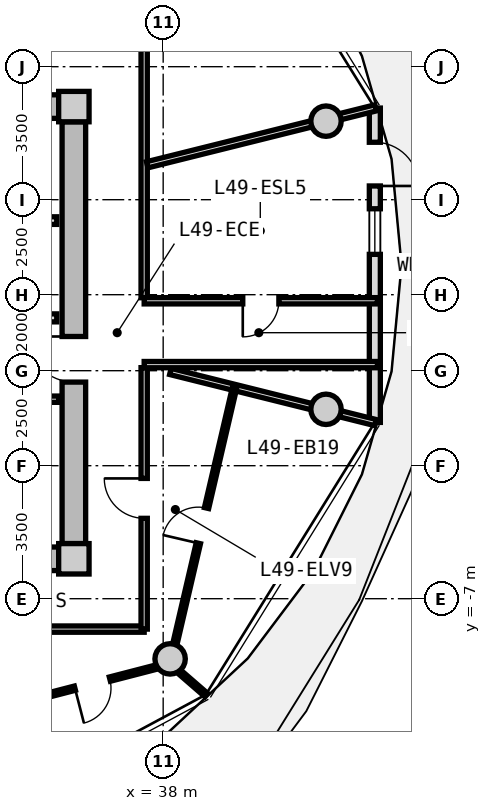
"""IFC4 building model, lengths in metres.
Left out: names, types, materials, properties, quantities, classifications, styles, units other than length and angle.
Written with IfcOpenShell. Run it as: python <this file> out.ifc"""

import sys

from ifc_helpers import new_model, si_unit, direction, frame, frame_2d, origin, origin_2d, place, context, subcontext, project, spatial, rectangle, circle, extrude, source, transform, mapped, element, fill, save


model = new_model("IFC4")
c1 = context("Model", 3, precision=1e-05, world=origin(), true_north=direction((0.0, 1.0)))
c2 = subcontext(c1, "Body", "Model", "MODEL_VIEW")
j1 = project(units=[si_unit("LENGTHUNIT", "METRE"), si_unit("PLANEANGLEUNIT", "RADIAN")], contexts=[c1])
p1 = place(None, origin())
s1 = spatial("IfcSite", under=j1, at=p1, CompositionType="ELEMENT")
p2 = place(p1, origin())
s2 = spatial("IfcBuilding", under=s1, at=p2, CompositionType="ELEMENT")
p3 = place(p2, frame((0.0, 0.0, 158.7)))
s3 = spatial("IfcBuildingStorey", under=s2, at=p3, CompositionType="ELEMENT", Elevation=158.7)
m1 = source(origin(), c2, "Body", "SweptSolid", [
    extrude(rectangle(XDim=0.8, YDim=0.8, at=origin_2d()), origin(), (0.0, 0.0, 1.0), 3.05),
])
for number, where, z_axis, x_axis in (
    (1, (35.65, -5.95, 0.0), (0.0, 0.0, 1.0), (1.0, 0.0, 0.0)),
    (2, (35.65, 5.95, 0.0), (0.0, 0.0, 1.0), (1.0, 0.0, 0.0)),
):
    element("IfcColumn", number, at=place(p3, frame(where, z_axis=z_axis, x_axis=x_axis)), inside=s3, PredefinedType="COLUMN", context=c2, shape_type="MappedRepresentation", body=[
        mapped(m1, transform((0.0, 0.0, 0.0), x_axis=(1.0, 0.0, 0.0), y_axis=(0.0, 1.0, 0.0), z_axis=(0.0, 0.0, 1.0), scale=1.0)),
    ])
m2 = source(origin(), c2, "Body", "SweptSolid", [
    extrude(rectangle(XDim=14.5, YDim=0.62, at=frame_2d((7.25, 0.0))), origin(), (0.0, 0.0, 1.0), 2.81),
])
for number, where, z_axis, x_axis in (
    (3, (20.75, 5.95, 0.0), (0.0, 0.0, 1.0), (1.0, 0.0, 0.0)),
    (4, (35.25, -5.95, 0.0), (0.0, 0.0, 1.0), (-1.0, 0.0, 0.0)),
):
    element("IfcWall", number, at=place(p3, frame(where, z_axis=z_axis, x_axis=x_axis)), inside=s3, PredefinedType="SHEAR", context=c2, shape_type="MappedRepresentation", body=[
        mapped(m2, transform((0.0, 0.0, 0.0), x_axis=(1.0, 0.0, 0.0), y_axis=(0.0, 1.0, 0.0), z_axis=(0.0, 0.0, 1.0), scale=1.0)),
    ])
m3 = source(origin(), c2, "Body", "SweptSolid", [
    extrude(rectangle(XDim=11.1, YDim=0.62, at=frame_2d((5.55, 0.0))), origin(), (0.0, 0.0, 1.0), 2.81),
])
p4 = place(p3, frame((35.65, 5.55, 0.0), z_axis=(0.0, 0.0, 1.0), x_axis=(0.0, -1.0, 0.0)))
e5 = element("IfcWall", 5, at=p4, inside=s3, PredefinedType="SHEAR", context=c2, shape_type="MappedRepresentation", body=[
    mapped(m3, transform((0.0, 0.0, 0.0), x_axis=(1.0, 0.0, 0.0), y_axis=(0.0, 1.0, 0.0), z_axis=(0.0, 0.0, 1.0), scale=1.0)),
])
p5 = place(p4, frame((5.65, 0.0, 0.0)))
e6 = element("IfcOpeningElement", 6, at=p5, cuts=e5, PredefinedType="OPENING", context=c2, shape_type="SweptSolid", body=[
    extrude(rectangle(XDim=1.2, YDim=2.15, at=frame_2d((0.6, 1.075))), frame((0.0, 0.32, 0.0), z_axis=(0.0, -1.0, 0.0), x_axis=(1.0, 0.0, 0.0)), (0.0, 0.0, 1.0), 0.64),
])
m4 = source(origin(), c2, "Body", "SweptSolid", [
    extrude(circle(Radius=0.4, at=origin_2d()), origin(), (0.0, 0.0, 1.0), 3.05),
])
for number, where, z_axis, x_axis in (
    (7, (42.285, 5.567, 0.0), (0.0, 0.0, 1.0), (1.0, 0.0, 0.0)),
    (8, (38.183, -8.584, 0.0), (0.0, 0.0, 1.0), (1.0, 0.0, 0.0)),
    (9, (42.285, -2.016, 0.0), (0.0, 0.0, 1.0), (1.0, 0.0, 0.0)),
):
    element("IfcColumn", number, at=place(p3, frame(where, z_axis=z_axis, x_axis=x_axis)), inside=s3, PredefinedType="COLUMN", context=c2, shape_type="MappedRepresentation", body=[
        mapped(m4, transform((0.0, 0.0, 0.0), x_axis=(1.0, 0.0, 0.0), y_axis=(0.0, 1.0, 0.0), z_axis=(0.0, 0.0, 1.0), scale=1.0)),
    ])
m5 = source(origin(), c2, "Body", "SweptSolid", [
    extrude(rectangle(XDim=8.272, YDim=0.29, at=frame_2d((4.136, 0.0))), origin(), (0.0, 0.0, 1.0), 2.81),
])
p6 = place(p3, frame((43.57, 5.911, 0.0), z_axis=(0.0, 0.0, 1.0), x_axis=(0.0, -1.0, 0.0)))
e10 = element("IfcWall", 10, at=p6, inside=s3, PredefinedType="SOLIDWALL", context=c2, shape_type="MappedRepresentation", body=[
    mapped(m5, transform((0.0, 0.0, 0.0), x_axis=(1.0, 0.0, 0.0), y_axis=(0.0, 1.0, 0.0), z_axis=(0.0, 0.0, 1.0), scale=1.0)),
])
p7 = place(p6, frame((0.9, 0.0, 0.0)))
e11 = element("IfcOpeningElement", 11, at=p7, cuts=e10, PredefinedType="OPENING", context=c2, shape_type="SweptSolid", body=[
    extrude(rectangle(XDim=1.15, YDim=2.25, at=frame_2d((0.575, 1.125))), frame((0.0, 0.155, 0.0), z_axis=(0.0, -1.0, 0.0), x_axis=(1.0, 0.0, 0.0)), (0.0, 0.0, 1.0), 0.31),
])
p8 = place(p6, frame((2.65, 0.0, 0.85)))
e12 = element("IfcOpeningElement", 12, at=p8, cuts=e10, PredefinedType="OPENING", context=c2, shape_type="SweptSolid", body=[
    extrude(rectangle(XDim=1.2, YDim=1.5, at=frame_2d((0.6, 0.75))), frame((0.0, 0.155, 0.0), z_axis=(0.0, -1.0, 0.0), x_axis=(1.0, 0.0, 0.0)), (0.0, 0.0, 1.0), 0.31),
])
m6 = source(origin(), c2, "Body", "SweptSolid", [
    extrude(rectangle(XDim=3.2, YDim=0.2, at=frame_2d((1.6, 0.0))), origin(), (0.0, 0.0, 1.0), 2.795),
])
p9 = place(p3, frame((32.0, 2.95, 0.0), z_axis=(0.0, 0.0, 1.0), x_axis=(1.0, 0.0, 0.0)))
e13 = element("IfcWall", 13, at=p9, inside=s3, PredefinedType="PARTITIONING", context=c2, shape_type="MappedRepresentation", body=[
    mapped(m6, transform((0.0, 0.0, 0.0), x_axis=(1.0, 0.0, 0.0), y_axis=(0.0, 1.0, 0.0), z_axis=(0.0, 0.0, 1.0), scale=1.0)),
])
m7 = source(origin(), c2, "Body", "SweptSolid", [
    extrude(rectangle(XDim=6.66, YDim=0.21, at=frame_2d((3.33, 0.0))), origin(), (0.0, 0.0, 1.0), 2.795),
])
p10 = place(p3, frame((28.54, 0.39, 0.0), z_axis=(0.0, 0.0, 1.0), x_axis=(1.0, 0.0, 0.0)))
e14 = element("IfcWall", 14, at=p10, inside=s3, PredefinedType="PARTITIONING", context=c2, shape_type="MappedRepresentation", body=[
    mapped(m7, transform((0.0, 0.0, 0.0), x_axis=(1.0, 0.0, 0.0), y_axis=(0.0, 1.0, 0.0), z_axis=(0.0, 0.0, 1.0), scale=1.0)),
])
p11 = place(p10, frame((1.0, 0.0, 0.0)))
e15 = element("IfcOpeningElement", 15, at=p11, cuts=e14, PredefinedType="OPENING", context=c2, shape_type="SweptSolid", body=[
    extrude(rectangle(XDim=1.2, YDim=2.15, at=frame_2d((0.6, 1.075))), frame((0.0, 0.115, 0.0), z_axis=(0.0, -1.0, 0.0), x_axis=(1.0, 0.0, 0.0)), (0.0, 0.0, 1.0), 0.23),
])
m8 = source(origin(), c2, "Body", "SweptSolid", [
    extrude(rectangle(XDim=2.7, YDim=0.165, at=frame_2d((1.35, 0.0))), origin(), (0.0, 0.0, 1.0), 2.795),
])
p12 = place(p3, frame((32.55, -1.75, 0.0), z_axis=(0.0, 0.0, 1.0), x_axis=(1.0, 0.0, 0.0)))
e16 = element("IfcWall", 16, at=p12, inside=s3, PredefinedType="PARTITIONING", context=c2, shape_type="MappedRepresentation", body=[
    mapped(m8, transform((0.0, 0.0, 0.0), x_axis=(1.0, 0.0, 0.0), y_axis=(0.0, 1.0, 0.0), z_axis=(0.0, 0.0, 1.0), scale=1.0)),
])
p13 = place(p12, frame((0.85, 0.0, 0.0)))
e17 = element("IfcOpeningElement", 17, at=p13, cuts=e16, PredefinedType="OPENING", context=c2, shape_type="SweptSolid", body=[
    extrude(rectangle(XDim=0.925, YDim=2.1, at=frame_2d((0.462, 1.05))), frame((0.0, 0.093, 0.0), z_axis=(0.0, -1.0, 0.0), x_axis=(1.0, 0.0, 0.0)), (0.0, 0.0, 1.0), 0.185),
])
m9 = source(origin(), c2, "Body", "SweptSolid", [
    extrude(rectangle(XDim=19.0, YDim=0.165, at=frame_2d((9.5, 0.0))), origin(), (0.0, 0.0, 1.0), 2.795),
])
p14 = place(p3, frame((37.5, -7.8, 0.0), z_axis=(0.0, 0.0, 1.0), x_axis=(-1.0, 0.0, 0.0)))
e18 = element("IfcWall", 18, at=p14, inside=s3, PredefinedType="PARTITIONING", context=c2, shape_type="MappedRepresentation", body=[
    mapped(m9, transform((0.0, 0.0, 0.0), x_axis=(1.0, 0.0, 0.0), y_axis=(0.0, 1.0, 0.0), z_axis=(0.0, 0.0, 1.0), scale=1.0)),
])
p15 = place(p14, frame((12.623, 0.0, 0.0)))
e19 = element("IfcOpeningElement", 19, at=p15, cuts=e18, PredefinedType="OPENING", context=c2, shape_type="SweptSolid", body=[
    extrude(rectangle(XDim=1.25, YDim=2.2, at=frame_2d((0.625, 1.1))), frame((0.0, 0.093, 0.0), z_axis=(0.0, -1.0, 0.0), x_axis=(1.0, 0.0, 0.0)), (0.0, 0.0, 1.0), 0.185),
])
m10 = source(origin(), c2, "Body", "SweptSolid", [
    extrude(rectangle(XDim=6.88, YDim=0.165, at=frame_2d((3.44, 0.0))), origin(), (0.0, 0.0, 1.0), 2.795),
])
p16 = place(p3, frame((37.5, 7.8, 0.0), z_axis=(0.0, 0.0, 1.0), x_axis=(0.0, -1.0, 0.0)))
e20 = element("IfcWall", 20, at=p16, inside=s3, PredefinedType="PARTITIONING", context=c2, shape_type="MappedRepresentation", body=[
    mapped(m10, transform((0.0, 0.0, 0.0), x_axis=(1.0, 0.0, 0.0), y_axis=(0.0, 1.0, 0.0), z_axis=(0.0, 0.0, 1.0), scale=1.0)),
])
p17 = place(p3, frame((37.5, -0.92, 0.0), z_axis=(0.0, 0.0, 1.0), x_axis=(0.0, -1.0, 0.0)))
e21 = element("IfcWall", 21, at=p17, inside=s3, PredefinedType="PARTITIONING", context=c2, shape_type="MappedRepresentation", body=[
    mapped(m10, transform((0.0, 0.0, 0.0), x_axis=(1.0, 0.0, 0.0), y_axis=(0.0, 1.0, 0.0), z_axis=(0.0, 0.0, 1.0), scale=1.0)),
])
p18 = place(p17, frame((2.915, 0.0, 0.0)))
e22 = element("IfcOpeningElement", 22, at=p18, cuts=e21, PredefinedType="OPENING", context=c2, shape_type="SweptSolid", body=[
    extrude(rectangle(XDim=1.05, YDim=2.15, at=frame_2d((0.525, 1.075))), frame((0.0, 0.093, 0.0), z_axis=(0.0, -1.0, 0.0), x_axis=(1.0, 0.0, 0.0)), (0.0, 0.0, 1.0), 0.185),
])
m11 = source(origin(), c2, "Body", "SweptSolid", [
    extrude(rectangle(XDim=5.564, YDim=0.165, at=frame_2d((2.782, 0.0))), origin(), (0.0, 0.0, 1.0), 2.345),
])
p19 = place(p3, frame((38.19, -1.02, 0.0), z_axis=(0.0, 0.0, 1.0), x_axis=(0.97031260977, -0.241854169533, 0.0)))
e23 = element("IfcWall", 23, at=p19, inside=s3, PredefinedType="PARTITIONING", context=c2, shape_type="MappedRepresentation", body=[
    mapped(m11, transform((0.0, 0.0, 0.0), x_axis=(1.0, 0.0, 0.0), y_axis=(0.0, 1.0, 0.0), z_axis=(0.0, 0.0, 1.0), scale=1.0)),
])
m12 = source(origin(), c2, "Body", "SweptSolid", [
    extrude(rectangle(XDim=6.193, YDim=0.165, at=frame_2d((3.096, 0.0))), origin(), (0.0, 0.0, 1.0), 2.345),
])
p20 = place(p3, frame((37.58, 4.419, 0.0), z_axis=(0.0, 0.0, 1.0), x_axis=(0.970309243466, 0.241867674657, 0.0)))
e24 = element("IfcWall", 24, at=p20, inside=s3, PredefinedType="PARTITIONING", context=c2, shape_type="MappedRepresentation", body=[
    mapped(m12, transform((0.0, 0.0, 0.0), x_axis=(1.0, 0.0, 0.0), y_axis=(0.0, 1.0, 0.0), z_axis=(0.0, 0.0, 1.0), scale=1.0)),
])
m13 = source(origin(), c2, "Body", "SweptSolid", [
    extrude(rectangle(XDim=6.139, YDim=0.165, at=frame_2d((3.069, 0.0))), origin(), (0.0, 0.0, 1.0), 2.795),
])
p21 = place(p3, frame((37.5, 0.84, 0.0), z_axis=(0.0, 0.0, 1.0), x_axis=(1.0, 0.0, 0.0)))
e25 = element("IfcWall", 25, at=p21, inside=s3, PredefinedType="PARTITIONING", context=c2, shape_type="MappedRepresentation", body=[
    mapped(m13, transform((0.0, 0.0, 0.0), x_axis=(1.0, 0.0, 0.0), y_axis=(0.0, 1.0, 0.0), z_axis=(0.0, 0.0, 1.0), scale=1.0)),
])
p22 = place(p21, frame((2.594, 0.0, 0.0)))
e26 = element("IfcOpeningElement", 26, at=p22, cuts=e25, PredefinedType="OPENING", context=c2, shape_type="SweptSolid", body=[
    extrude(rectangle(XDim=0.95, YDim=2.1, at=frame_2d((0.475, 1.05))), frame((0.0, 0.093, 0.0), z_axis=(0.0, -1.0, 0.0), x_axis=(1.0, 0.0, 0.0)), (0.0, 0.0, 1.0), 0.185),
])
p23 = place(p3, frame((43.639, -0.84, 0.0), z_axis=(0.0, 0.0, 1.0), x_axis=(-1.0, 0.0, 0.0)))
e27 = element("IfcWall", 27, at=p23, inside=s3, PredefinedType="PARTITIONING", context=c2, shape_type="MappedRepresentation", body=[
    mapped(m13, transform((0.0, 0.0, 0.0), x_axis=(1.0, 0.0, 0.0), y_axis=(0.0, 1.0, 0.0), z_axis=(0.0, 0.0, 1.0), scale=1.0)),
])
m14 = source(origin(), c2, "Body", "SweptSolid", [
    extrude(rectangle(XDim=7.469, YDim=0.115, at=frame_2d((3.734, 0.0))), origin(), (0.0, 0.0, 1.0), 2.795),
])
p24 = place(p3, frame((38.187, -8.715, 0.0), z_axis=(0.0, 0.0, 1.0), x_axis=(0.226790420763, 0.973943584121, 0.0)))
e28 = element("IfcWall", 28, at=p24, inside=s3, PredefinedType="PARTITIONING", context=c2, shape_type="MappedRepresentation", body=[
    mapped(m14, transform((0.0, 0.0, 0.0), x_axis=(1.0, 0.0, 0.0), y_axis=(0.0, 1.0, 0.0), z_axis=(0.0, 0.0, 1.0), scale=1.0)),
])
p25 = place(p24, frame((3.259, 0.0, 0.0)))
e29 = element("IfcOpeningElement", 29, at=p25, cuts=e28, PredefinedType="OPENING", context=c2, shape_type="SweptSolid", body=[
    extrude(rectangle(XDim=0.95, YDim=2.1, at=frame_2d((0.475, 1.05))), frame((0.0, 0.067, 0.0), z_axis=(0.0, -1.0, 0.0), x_axis=(1.0, 0.0, 0.0)), (0.0, 0.0, 1.0), 0.135),
])
m15 = source(origin(), c2, "Body", "SweptSolid", [
    extrude(rectangle(XDim=1.258, YDim=0.115, at=frame_2d((0.629, 0.0))), origin(), (0.0, 0.0, 1.0), 2.795),
])
p26 = place(p3, frame((38.187, -8.715, 0.0), z_axis=(0.0, 0.0, 1.0), x_axis=(0.755765923317, -0.654841865761, 0.0)))
e30 = element("IfcWall", 30, at=p26, inside=s3, PredefinedType="PARTITIONING", context=c2, shape_type="MappedRepresentation", body=[
    mapped(m15, transform((0.0, 0.0, 0.0), x_axis=(1.0, 0.0, 0.0), y_axis=(0.0, 1.0, 0.0), z_axis=(0.0, 0.0, 1.0), scale=1.0)),
])
m16 = source(origin(), c2, "Body", "SweptSolid", [
    extrude(rectangle(XDim=2.194, YDim=0.115, at=frame_2d((1.097, 0.0))), origin(), (0.0, 0.0, 1.0), 2.795),
])
p27 = place(p3, frame((34.095, -9.764, 0.0), z_axis=(0.0, 0.0, 1.0), x_axis=(0.540858831194, -0.841113383985, 0.0)))
e31 = element("IfcWall", 31, at=p27, inside=s3, PredefinedType="PARTITIONING", context=c2, shape_type="MappedRepresentation", body=[
    mapped(m16, transform((0.0, 0.0, 0.0), x_axis=(1.0, 0.0, 0.0), y_axis=(0.0, 1.0, 0.0), z_axis=(0.0, 0.0, 1.0), scale=1.0)),
])
m17 = source(origin(), c2, "Body", "SweptSolid", [
    extrude(rectangle(XDim=4.218, YDim=0.115, at=frame_2d((2.109, 0.0))), origin(), (0.0, 0.0, 1.0), 2.345),
])
p28 = place(p3, frame((34.095, -9.764, 0.0), z_axis=(0.0, 0.0, 1.0), x_axis=(0.968124892577, 0.250467946797, 0.0)))
e32 = element("IfcWall", 32, at=p28, inside=s3, PredefinedType="PARTITIONING", context=c2, shape_type="MappedRepresentation", body=[
    mapped(m17, transform((0.0, 0.0, 0.0), x_axis=(1.0, 0.0, 0.0), y_axis=(0.0, 1.0, 0.0), z_axis=(0.0, 0.0, 1.0), scale=1.0)),
])
p29 = place(p28, frame((1.634, 0.0, 0.0)))
e33 = element("IfcOpeningElement", 33, at=p29, cuts=e32, PredefinedType="OPENING", context=c2, shape_type="SweptSolid", body=[
    extrude(rectangle(XDim=0.95, YDim=2.1, at=frame_2d((0.475, 1.05))), frame((0.0, 0.067, 0.0), z_axis=(0.0, -1.0, 0.0), x_axis=(1.0, 0.0, 0.0)), (0.0, 0.0, 1.0), 0.135),
])
m18 = source(origin(), c2, "Body", "SweptSolid", [
    extrude(rectangle(XDim=1.15, YDim=2.25, at=frame_2d((0.575, 1.125))), frame((0.0, 0.025, 0.0), z_axis=(0.0, -1.0, 0.0), x_axis=(1.0, 0.0, 0.0)), (0.0, 0.0, 1.0), 0.05),
])
p30 = place(p7, origin())
e34 = element("IfcDoor", 34, at=p30, inside=s3, OperationType="SINGLE_SWING_RIGHT", PredefinedType="DOOR", context=c2, shape_type="MappedRepresentation", body=[
    mapped(m18, transform((0.0, 0.0, 0.0), x_axis=(1.0, 0.0, 0.0), y_axis=(0.0, 1.0, 0.0), z_axis=(0.0, 0.0, 1.0), scale=1.0)),
])
fill(e11, e34)
m19 = source(origin(), c2, "Body", "SweptSolid", [
    extrude(rectangle(XDim=1.2, YDim=1.5, at=frame_2d((0.6, 0.75))), frame((0.0, 0.03, 0.0), z_axis=(0.0, -1.0, 0.0), x_axis=(1.0, 0.0, 0.0)), (0.0, 0.0, 1.0), 0.06),
])
p31 = place(p8, origin())
e35 = element("IfcWindow", 35, at=p31, inside=s3, PartitioningType="SINGLE_PANEL", PredefinedType="WINDOW", context=c2, shape_type="MappedRepresentation", body=[
    mapped(m19, transform((0.0, 0.0, 0.0), x_axis=(1.0, 0.0, 0.0), y_axis=(0.0, 1.0, 0.0), z_axis=(0.0, 0.0, 1.0), scale=1.0)),
])
fill(e12, e35)
m20 = source(origin(), c2, "Body", "SweptSolid", [
    extrude(rectangle(XDim=1.2, YDim=2.15, at=frame_2d((0.6, 1.075))), frame((0.0, 0.025, 0.0), z_axis=(0.0, -1.0, 0.0), x_axis=(1.0, 0.0, 0.0)), (0.0, 0.0, 1.0), 0.05),
])
p32 = place(p5, frame((1.2, 0.0, 0.0), z_axis=(0.0, 0.0, 1.0), x_axis=(-1.0, 0.0, 0.0)))
e36 = element("IfcDoor", 36, at=p32, inside=s3, OperationType="SINGLE_SWING_RIGHT", PredefinedType="DOOR", context=c2, shape_type="MappedRepresentation", body=[
    mapped(m20, transform((0.0, 0.0, 0.0), x_axis=(1.0, 0.0, 0.0), y_axis=(0.0, 1.0, 0.0), z_axis=(0.0, 0.0, 1.0), scale=1.0)),
])
fill(e6, e36)
m21 = source(origin(), c2, "Body", "SweptSolid", [
    extrude(rectangle(XDim=0.95, YDim=2.1, at=frame_2d((0.475, 1.05))), frame((0.0, 0.025, 0.0), z_axis=(0.0, -1.0, 0.0), x_axis=(1.0, 0.0, 0.0)), (0.0, 0.0, 1.0), 0.05),
])
p33 = place(p22, frame((0.95, 0.0, 0.0), z_axis=(0.0, 0.0, 1.0), x_axis=(-1.0, 0.0, 0.0)))
e37 = element("IfcDoor", 37, at=p33, inside=s3, OperationType="SINGLE_SWING_RIGHT", PredefinedType="DOOR", context=c2, shape_type="MappedRepresentation", body=[
    mapped(m21, transform((0.0, 0.0, 0.0), x_axis=(1.0, 0.0, 0.0), y_axis=(0.0, 1.0, 0.0), z_axis=(0.0, 0.0, 1.0), scale=1.0)),
])
fill(e26, e37)
m22 = source(origin(), c2, "Body", "SweptSolid", [
    extrude(rectangle(XDim=1.05, YDim=2.15, at=frame_2d((0.525, 1.075))), frame((0.0, 0.025, 0.0), z_axis=(0.0, -1.0, 0.0), x_axis=(1.0, 0.0, 0.0)), (0.0, 0.0, 1.0), 0.05),
])
p34 = place(p18, frame((1.05, 0.0, 0.0), z_axis=(0.0, 0.0, 1.0), x_axis=(-1.0, 0.0, 0.0)))
e38 = element("IfcDoor", 38, at=p34, inside=s3, OperationType="SINGLE_SWING_RIGHT", PredefinedType="DOOR", context=c2, shape_type="MappedRepresentation", body=[
    mapped(m22, transform((0.0, 0.0, 0.0), x_axis=(1.0, 0.0, 0.0), y_axis=(0.0, 1.0, 0.0), z_axis=(0.0, 0.0, 1.0), scale=1.0)),
])
fill(e22, e38)
p35 = place(p29, frame((0.95, 0.0, 0.0), z_axis=(0.0, 0.0, 1.0), x_axis=(-1.0, 0.0, 0.0)))
e39 = element("IfcDoor", 39, at=p35, inside=s3, OperationType="SINGLE_SWING_RIGHT", PredefinedType="DOOR", context=c2, shape_type="MappedRepresentation", body=[
    mapped(m21, transform((0.0, 0.0, 0.0), x_axis=(1.0, 0.0, 0.0), y_axis=(0.0, 1.0, 0.0), z_axis=(0.0, 0.0, 1.0), scale=1.0)),
])
fill(e33, e39)
p36 = place(p25, origin())
e40 = element("IfcDoor", 40, at=p36, inside=s3, OperationType="SINGLE_SWING_LEFT", PredefinedType="DOOR", context=c2, shape_type="MappedRepresentation", body=[
    mapped(m21, transform((0.0, 0.0, 0.0), x_axis=(1.0, 0.0, 0.0), y_axis=(0.0, 1.0, 0.0), z_axis=(0.0, 0.0, 1.0), scale=1.0)),
])
fill(e29, e40)
save(model, sys.argv[1])
